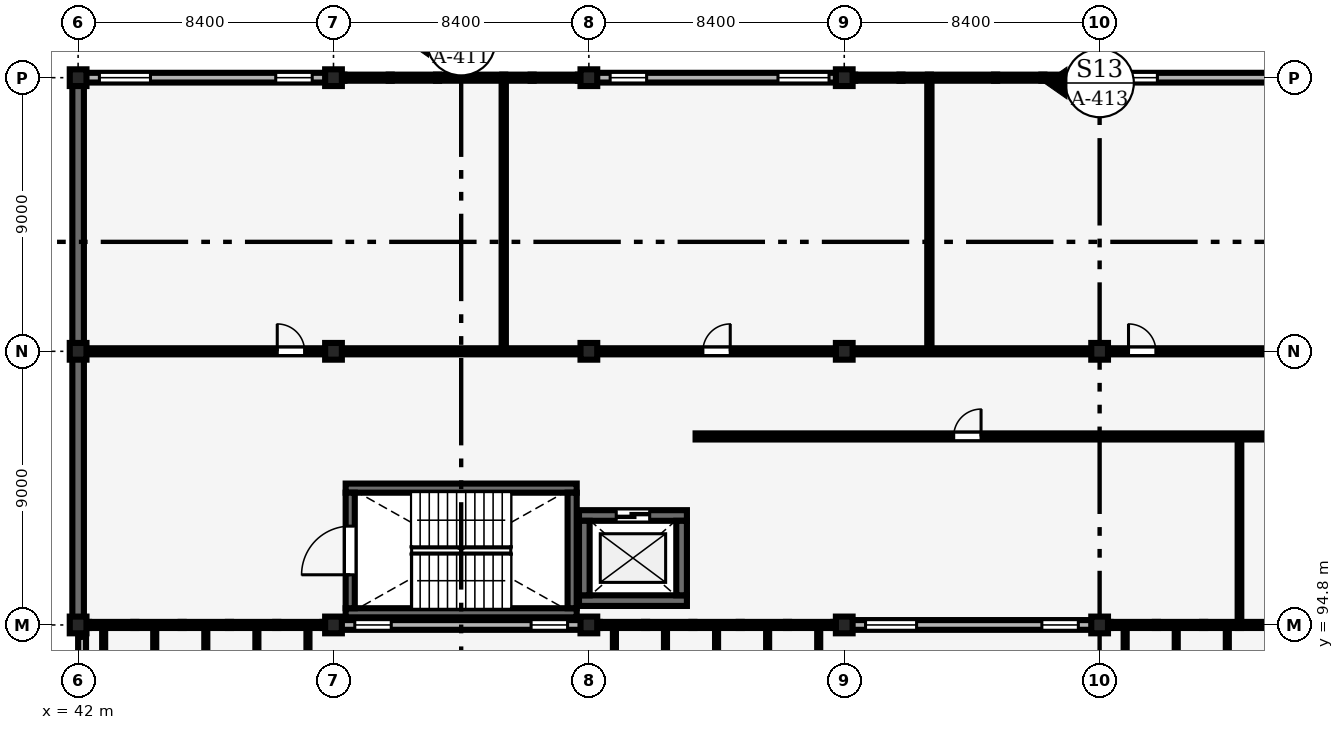
"""IFC4 building model, lengths in metres.
Left out: names, types, materials, properties, quantities, classifications, styles, units other than length and angle.
Written with IfcOpenShell. Run it as: python <this file> out.ifc"""

import sys

from ifc_helpers import new_model, si_unit, direction, frame, frame_2d, origin, origin_2d, place, context, subcontext, project, spatial, rectangle, extrude, element, fill, save


model = new_model("IFC4")
c1 = context("Model", 3, precision=1e-05, world=origin(), true_north=direction((0.0, 1.0)))
c2 = subcontext(c1, "Body", "Model", "MODEL_VIEW")
j1 = project(units=[si_unit("LENGTHUNIT", "METRE"), si_unit("PLANEANGLEUNIT", "RADIAN")], contexts=[c1])
p1 = place(None, origin())
s1 = spatial("IfcSite", under=j1, at=p1, CompositionType="ELEMENT")
p2 = place(p1, origin())
s2 = spatial("IfcBuilding", under=s1, at=p2, CompositionType="ELEMENT")
p3 = place(p2, frame((0.0, 0.0, 9.0)))
s3 = spatial("IfcBuildingStorey", under=s2, at=p3, CompositionType="ELEMENT", Elevation=9.0)
for number, where, z_axis, x_axis in (
    (1, (42.0, 94.8, 0.0), (0.0, 0.0, 1.0), (1.0, 0.0, 0.0)),
    (2, (42.0, 103.8, 0.0), (0.0, 0.0, 1.0), (1.0, 0.0, 0.0)),
    (3, (42.0, 112.8, 0.0), (0.0, 0.0, 1.0), (1.0, 0.0, 0.0)),
    (4, (50.4, 94.8, 0.0), (0.0, 0.0, 1.0), (1.0, 0.0, 0.0)),
    (5, (50.4, 103.8, 0.0), (0.0, 0.0, 1.0), (1.0, 0.0, 0.0)),
    (6, (50.4, 112.8, 0.0), (0.0, 0.0, 1.0), (1.0, 0.0, 0.0)),
    (7, (58.8, 94.8, 0.0), (0.0, 0.0, 1.0), (1.0, 0.0, 0.0)),
    (8, (58.8, 103.8, 0.0), (0.0, 0.0, 1.0), (1.0, 0.0, 0.0)),
    (9, (58.8, 112.8, 0.0), (0.0, 0.0, 1.0), (1.0, 0.0, 0.0)),
    (10, (67.2, 94.8, 0.0), (0.0, 0.0, 1.0), (1.0, 0.0, 0.0)),
    (11, (67.2, 103.8, 0.0), (0.0, 0.0, 1.0), (1.0, 0.0, 0.0)),
    (12, (67.2, 112.8, 0.0), (0.0, 0.0, 1.0), (1.0, 0.0, 0.0)),
    (13, (75.6, 94.8, 0.0), (0.0, 0.0, 1.0), (1.0, 0.0, 0.0)),
    (14, (75.6, 103.8, 0.0), (0.0, 0.0, 1.0), (1.0, 0.0, 0.0)),
    (15, (75.6, 112.8, 0.0), (0.0, 0.0, 1.0), (1.0, 0.0, 0.0)),
):
    element("IfcColumn", number, at=place(p3, frame(where, z_axis=z_axis, x_axis=x_axis)), inside=s3, PredefinedType="COLUMN", context=c2, shape_type="SweptSolid", body=[
        extrude(rectangle(XDim=0.55, YDim=0.55, at=origin_2d()), origin(), (0.0, 0.0, 1.0), 4.2),
    ])
p4 = place(p3, frame((42.25, 112.8, 0.0), z_axis=(0.0, 0.0, 1.0), x_axis=(1.0, 0.0, 0.0)))
e16 = element("IfcWall", 16, at=p4, inside=s3, PredefinedType="SOLIDWALL", context=c2, shape_type="SweptSolid", body=[
    extrude(rectangle(XDim=7.9, YDim=0.32, at=frame_2d((3.95, 0.0))), origin(), (0.0, 0.0, 1.0), 2.81),
])
p5 = place(p4, frame((0.45, 0.0, 0.9)))
e17 = element("IfcOpeningElement", 17, at=p5, cuts=e16, PredefinedType="OPENING", context=c2, shape_type="SweptSolid", body=[
    extrude(rectangle(XDim=1.68, YDim=1.76, at=frame_2d((0.84, 0.88))), frame((0.0, 0.17, 0.0), z_axis=(0.0, -1.0, 0.0), x_axis=(1.0, 0.0, 0.0)), (0.0, 0.0, 1.0), 0.34),
])
p6 = place(p4, frame((6.25, 0.0, 0.9)))
e18 = element("IfcOpeningElement", 18, at=p6, cuts=e16, PredefinedType="OPENING", context=c2, shape_type="SweptSolid", body=[
    extrude(rectangle(XDim=1.2, YDim=1.5, at=frame_2d((0.6, 0.75))), frame((0.0, 0.17, 0.0), z_axis=(0.0, -1.0, 0.0), x_axis=(1.0, 0.0, 0.0)), (0.0, 0.0, 1.0), 0.34),
])
p7 = place(p3, frame((59.05, 112.8, 0.0), z_axis=(0.0, 0.0, 1.0), x_axis=(1.0, 0.0, 0.0)))
e19 = element("IfcWall", 19, at=p7, inside=s3, PredefinedType="SOLIDWALL", context=c2, shape_type="SweptSolid", body=[
    extrude(rectangle(XDim=7.9, YDim=0.32, at=frame_2d((3.95, 0.0))), origin(), (0.0, 0.0, 1.0), 3.36),
])
p8 = place(p7, frame((0.45, 0.0, 0.9)))
e20 = element("IfcOpeningElement", 20, at=p8, cuts=e19, PredefinedType="OPENING", context=c2, shape_type="SweptSolid", body=[
    extrude(rectangle(XDim=1.2, YDim=1.8, at=frame_2d((0.6, 0.9))), frame((0.0, 0.17, 0.0), z_axis=(0.0, -1.0, 0.0), x_axis=(1.0, 0.0, 0.0)), (0.0, 0.0, 1.0), 0.34),
])
p9 = place(p7, frame((5.97, 0.0, 0.9)))
e21 = element("IfcOpeningElement", 21, at=p9, cuts=e19, PredefinedType="OPENING", context=c2, shape_type="SweptSolid", body=[
    extrude(rectangle(XDim=1.68, YDim=2.31, at=frame_2d((0.84, 1.155))), frame((0.0, 0.17, 0.0), z_axis=(0.0, -1.0, 0.0), x_axis=(1.0, 0.0, 0.0)), (0.0, 0.0, 1.0), 0.34),
])
p10 = place(p3, frame((75.85, 112.8, 0.0), z_axis=(0.0, 0.0, 1.0), x_axis=(1.0, 0.0, 0.0)))
e22 = element("IfcWall", 22, at=p10, inside=s3, PredefinedType="SOLIDWALL", context=c2, shape_type="SweptSolid", body=[
    extrude(rectangle(XDim=7.9, YDim=0.32, at=frame_2d((3.95, 0.0))), origin(), (0.0, 0.0, 1.0), 3.26),
])
p11 = place(p10, frame((0.45, 0.0, 0.9)))
e23 = element("IfcOpeningElement", 23, at=p11, cuts=e22, PredefinedType="OPENING", context=c2, shape_type="SweptSolid", body=[
    extrude(rectangle(XDim=1.2, YDim=1.5, at=frame_2d((0.6, 0.75))), frame((0.0, 0.17, 0.0), z_axis=(0.0, -1.0, 0.0), x_axis=(1.0, 0.0, 0.0)), (0.0, 0.0, 1.0), 0.34),
])
p12 = place(p10, frame((6.25, 0.0, 0.9)))
e24 = element("IfcOpeningElement", 24, at=p12, cuts=e22, PredefinedType="OPENING", context=c2, shape_type="SweptSolid", body=[
    extrude(rectangle(XDim=1.2, YDim=1.8, at=frame_2d((0.6, 0.9))), frame((0.0, 0.17, 0.0), z_axis=(0.0, -1.0, 0.0), x_axis=(1.0, 0.0, 0.0)), (0.0, 0.0, 1.0), 0.34),
])
p13 = place(p3, frame((42.0, 95.05, 0.0), z_axis=(0.0, 0.0, 1.0), x_axis=(0.0, 1.0, 0.0)))
e25 = element("IfcWall", 25, at=p13, inside=s3, PredefinedType="SHEAR", context=c2, shape_type="SweptSolid", body=[
    extrude(rectangle(XDim=8.5, YDim=0.38, at=frame_2d((4.25, 0.0))), origin(), (0.0, 0.0, 1.0), 3.36),
])
p14 = place(p3, frame((42.0, 104.05, 0.0), z_axis=(0.0, 0.0, 1.0), x_axis=(0.0, 1.0, 0.0)))
e26 = element("IfcWall", 26, at=p14, inside=s3, PredefinedType="SHEAR", context=c2, shape_type="SweptSolid", body=[
    extrude(rectangle(XDim=8.5, YDim=0.38, at=frame_2d((4.25, 0.0))), origin(), (0.0, 0.0, 1.0), 3.31),
])
p15 = place(p3, frame((50.65, 94.8, 0.0), z_axis=(0.0, 0.0, 1.0), x_axis=(1.0, 0.0, 0.0)))
e27 = element("IfcWall", 27, at=p15, inside=s3, PredefinedType="SOLIDWALL", context=c2, shape_type="SweptSolid", body=[
    extrude(rectangle(XDim=7.9, YDim=0.32, at=frame_2d((3.95, 0.0))), origin(), (0.0, 0.0, 1.0), 3.36),
])
p16 = place(p15, frame((0.45, 0.0, 0.9)))
e28 = element("IfcOpeningElement", 28, at=p16, cuts=e27, PredefinedType="OPENING", context=c2, shape_type="SweptSolid", body=[
    extrude(rectangle(XDim=1.2, YDim=1.5, at=frame_2d((0.6, 0.75))), frame((0.0, 0.17, 0.0), z_axis=(0.0, -1.0, 0.0), x_axis=(1.0, 0.0, 0.0)), (0.0, 0.0, 1.0), 0.34),
])
p17 = place(p15, frame((6.25, 0.0, 0.9)))
e29 = element("IfcOpeningElement", 29, at=p17, cuts=e27, PredefinedType="OPENING", context=c2, shape_type="SweptSolid", body=[
    extrude(rectangle(XDim=1.2, YDim=1.8, at=frame_2d((0.6, 0.9))), frame((0.0, 0.17, 0.0), z_axis=(0.0, -1.0, 0.0), x_axis=(1.0, 0.0, 0.0)), (0.0, 0.0, 1.0), 0.34),
])
p18 = place(p3, frame((67.45, 94.8, 0.0), z_axis=(0.0, 0.0, 1.0), x_axis=(1.0, 0.0, 0.0)))
e30 = element("IfcWall", 30, at=p18, inside=s3, PredefinedType="SOLIDWALL", context=c2, shape_type="SweptSolid", body=[
    extrude(rectangle(XDim=7.9, YDim=0.32, at=frame_2d((3.95, 0.0))), origin(), (0.0, 0.0, 1.0), 3.31),
])
p19 = place(p18, frame((0.45, 0.0, 0.9)))
e31 = element("IfcOpeningElement", 31, at=p19, cuts=e30, PredefinedType="OPENING", context=c2, shape_type="SweptSolid", body=[
    extrude(rectangle(XDim=1.68, YDim=2.26, at=frame_2d((0.84, 1.13))), frame((0.0, 0.17, 0.0), z_axis=(0.0, -1.0, 0.0), x_axis=(1.0, 0.0, 0.0)), (0.0, 0.0, 1.0), 0.34),
])
p20 = place(p18, frame((6.25, 0.0, 0.9)))
e32 = element("IfcOpeningElement", 32, at=p20, cuts=e30, PredefinedType="OPENING", context=c2, shape_type="SweptSolid", body=[
    extrude(rectangle(XDim=1.2, YDim=1.5, at=frame_2d((0.6, 0.75))), frame((0.0, 0.17, 0.0), z_axis=(0.0, -1.0, 0.0), x_axis=(1.0, 0.0, 0.0)), (0.0, 0.0, 1.0), 0.34),
])
p21 = place(p3, frame((42.13, 86.19, 0.0), z_axis=(0.0, 0.0, 1.0), x_axis=(0.0, 1.0, 0.0)))
e33 = element("IfcWall", 33, at=p21, inside=s3, PredefinedType="PARAPET", context=c2, shape_type="SweptSolid", body=[
    extrude(rectangle(XDim=8.22, YDim=0.26, at=frame_2d((4.11, 0.0))), origin(), (0.0, 0.0, 1.0), 0.85),
])
for number, where, z_axis, x_axis in (
    (34, (50.8, 95.2, 0.0), (0.0, 0.0, 1.0), (1.0, 0.0, 0.0)),
    (35, (50.8, 99.3, 0.0), (0.0, 0.0, 1.0), (1.0, 0.0, 0.0)),
):
    element("IfcWall", number, at=place(p3, frame(where, z_axis=z_axis, x_axis=x_axis)), inside=s3, PredefinedType="SHEAR", context=c2, shape_type="SweptSolid", body=[
        extrude(rectangle(XDim=7.6, YDim=0.3, at=frame_2d((3.8, 0.0))), origin(), (0.0, 0.0, 1.0), 4.025),
    ])
p22 = place(p3, frame((50.95, 95.35, 0.0), z_axis=(0.0, 0.0, 1.0), x_axis=(0.0, 1.0, 0.0)))
e36 = element("IfcWall", 36, at=p22, inside=s3, PredefinedType="SHEAR", context=c2, shape_type="SweptSolid", body=[
    extrude(rectangle(XDim=3.8, YDim=0.3, at=frame_2d((1.9, 0.0))), origin(), (0.0, 0.0, 1.0), 4.025),
])
p23 = place(p22, frame((1.1, 0.0, 0.0)))
e37 = element("IfcOpeningElement", 37, at=p23, cuts=e36, PredefinedType="OPENING", context=c2, shape_type="SweptSolid", body=[
    extrude(rectangle(XDim=1.6, YDim=2.2, at=frame_2d((0.8, 1.1))), frame((0.0, 0.16, 0.0), z_axis=(0.0, -1.0, 0.0), x_axis=(1.0, 0.0, 0.0)), (0.0, 0.0, 1.0), 0.32),
])
p24 = place(p3, frame((58.25, 95.35, 0.0), z_axis=(0.0, 0.0, 1.0), x_axis=(0.0, 1.0, 0.0)))
e38 = element("IfcWall", 38, at=p24, inside=s3, PredefinedType="SHEAR", context=c2, shape_type="SweptSolid", body=[
    extrude(rectangle(XDim=3.8, YDim=0.3, at=frame_2d((1.9, 0.0))), origin(), (0.0, 0.0, 1.0), 4.025),
])
p25 = place(p3, frame((58.475, 95.6, 0.0), z_axis=(0.0, 0.0, 1.0), x_axis=(1.0, 0.0, 0.0)))
e39 = element("IfcWall", 39, at=p25, inside=s3, PredefinedType="SHEAR", context=c2, shape_type="SweptSolid", body=[
    extrude(rectangle(XDim=3.55, YDim=0.35, at=frame_2d((1.775, 0.0))), origin(), (0.0, 0.0, 1.0), 3.92),
])
p26 = place(p3, frame((58.475, 98.4, 0.0), z_axis=(0.0, 0.0, 1.0), x_axis=(1.0, 0.0, 0.0)))
e40 = element("IfcWall", 40, at=p26, inside=s3, PredefinedType="SHEAR", context=c2, shape_type="SweptSolid", body=[
    extrude(rectangle(XDim=3.55, YDim=0.35, at=frame_2d((1.775, 0.0))), origin(), (0.0, 0.0, 1.0), 3.92),
])
p27 = place(p26, frame((1.225, 0.0, 0.0)))
e41 = element("IfcOpeningElement", 41, at=p27, cuts=e40, PredefinedType="OPENING", context=c2, shape_type="SweptSolid", body=[
    extrude(rectangle(XDim=1.1, YDim=2.2, at=frame_2d((0.55, 1.1))), frame((0.0, 0.185, 0.0), z_axis=(0.0, -1.0, 0.0), x_axis=(1.0, 0.0, 0.0)), (0.0, 0.0, 1.0), 0.37),
])
for number, where, z_axis, x_axis in (
    (42, (58.65, 95.775, 0.0), (0.0, 0.0, 1.0), (0.0, 1.0, 0.0)),
    (43, (61.85, 95.775, 0.0), (0.0, 0.0, 1.0), (0.0, 1.0, 0.0)),
):
    element("IfcWall", number, at=place(p3, frame(where, z_axis=z_axis, x_axis=x_axis)), inside=s3, PredefinedType="SHEAR", context=c2, shape_type="SweptSolid", body=[
        extrude(rectangle(XDim=2.45, YDim=0.35, at=frame_2d((1.225, 0.0))), origin(), (0.0, 0.0, 1.0), 3.92),
    ])
for number, where, z_axis, x_axis in (
    (44, (56.0, 103.905, 0.0), (0.0, 0.0, 1.0), (0.0, 1.0, 0.0)),
    (45, (70.0, 103.905, 0.0), (0.0, 0.0, 1.0), (0.0, 1.0, 0.0)),
):
    element("IfcWall", number, at=place(p3, frame(where, z_axis=z_axis, x_axis=x_axis)), inside=s3, PredefinedType="PARTITIONING", context=c2, shape_type="SweptSolid", body=[
        extrude(rectangle(XDim=8.79, YDim=0.14, at=frame_2d((4.395, 0.0))), origin(), (0.0, 0.0, 1.0), 3.9),
    ])
p28 = place(p3, frame((42.195, 103.8, 0.0), z_axis=(0.0, 0.0, 1.0), x_axis=(1.0, 0.0, 0.0)))
e46 = element("IfcWall", 46, at=p28, inside=s3, PredefinedType="PARTITIONING", context=c2, shape_type="SweptSolid", body=[
    extrude(rectangle(XDim=7.92, YDim=0.2, at=frame_2d((3.96, 0.0))), origin(), (0.0, 0.0, 1.0), 3.21),
])
p29 = place(p28, frame((6.355, 0.0, 0.0)))
e47 = element("IfcOpeningElement", 47, at=p29, cuts=e46, PredefinedType="OPENING", context=c2, shape_type="SweptSolid", body=[
    extrude(rectangle(XDim=0.9, YDim=2.1, at=frame_2d((0.45, 1.05))), frame((0.0, 0.11, 0.0), z_axis=(0.0, -1.0, 0.0), x_axis=(1.0, 0.0, 0.0)), (0.0, 0.0, 1.0), 0.22),
])
p30 = place(p3, frame((50.685, 103.8, 0.0), z_axis=(0.0, 0.0, 1.0), x_axis=(1.0, 0.0, 0.0)))
e48 = element("IfcWall", 48, at=p30, inside=s3, PredefinedType="PARTITIONING", context=c2, shape_type="SweptSolid", body=[
    extrude(rectangle(XDim=7.83, YDim=0.2, at=frame_2d((3.915, 0.0))), origin(), (0.0, 0.0, 1.0), 3.16),
])
p31 = place(p3, frame((59.085, 103.8, 0.0), z_axis=(0.0, 0.0, 1.0), x_axis=(1.0, 0.0, 0.0)))
e49 = element("IfcWall", 49, at=p31, inside=s3, PredefinedType="PARTITIONING", context=c2, shape_type="SweptSolid", body=[
    extrude(rectangle(XDim=7.83, YDim=0.2, at=frame_2d((3.915, 0.0))), origin(), (0.0, 0.0, 1.0), 3.11),
])
p32 = place(p31, frame((3.465, 0.0, 0.0)))
e50 = element("IfcOpeningElement", 50, at=p32, cuts=e49, PredefinedType="OPENING", context=c2, shape_type="SweptSolid", body=[
    extrude(rectangle(XDim=0.9, YDim=2.1, at=frame_2d((0.45, 1.05))), frame((0.0, 0.11, 0.0), z_axis=(0.0, -1.0, 0.0), x_axis=(1.0, 0.0, 0.0)), (0.0, 0.0, 1.0), 0.22),
])
p33 = place(p3, frame((67.485, 103.8, 0.0), z_axis=(0.0, 0.0, 1.0), x_axis=(1.0, 0.0, 0.0)))
e51 = element("IfcWall", 51, at=p33, inside=s3, PredefinedType="PARTITIONING", context=c2, shape_type="SweptSolid", body=[
    extrude(rectangle(XDim=7.83, YDim=0.2, at=frame_2d((3.915, 0.0))), origin(), (0.0, 0.0, 1.0), 3.11),
])
p34 = place(p3, frame((75.885, 103.8, 0.0), z_axis=(0.0, 0.0, 1.0), x_axis=(1.0, 0.0, 0.0)))
e52 = element("IfcWall", 52, at=p34, inside=s3, PredefinedType="PARTITIONING", context=c2, shape_type="SweptSolid", body=[
    extrude(rectangle(XDim=7.83, YDim=0.2, at=frame_2d((3.915, 0.0))), origin(), (0.0, 0.0, 1.0), 3.06),
])
p35 = place(p34, frame((0.665, 0.0, 0.0)))
e53 = element("IfcOpeningElement", 53, at=p35, cuts=e52, PredefinedType="OPENING", context=c2, shape_type="SweptSolid", body=[
    extrude(rectangle(XDim=0.9, YDim=2.1, at=frame_2d((0.45, 1.05))), frame((0.0, 0.11, 0.0), z_axis=(0.0, -1.0, 0.0), x_axis=(1.0, 0.0, 0.0)), (0.0, 0.0, 1.0), 0.22),
])
p36 = place(p3, frame((80.2, 94.905, 0.0), z_axis=(0.0, 0.0, 1.0), x_axis=(0.0, 1.0, 0.0)))
e54 = element("IfcWall", 54, at=p36, inside=s3, PredefinedType="PARTITIONING", context=c2, shape_type="SweptSolid", body=[
    extrude(rectangle(XDim=5.99, YDim=0.12, at=frame_2d((2.995, 0.0))), origin(), (0.0, 0.0, 1.0), 3.9),
])
p37 = place(p3, frame((62.31, 101.0, 0.0), z_axis=(0.0, 0.0, 1.0), x_axis=(1.0, 0.0, 0.0)))
e55 = element("IfcWall", 55, at=p37, inside=s3, PredefinedType="PARTITIONING", context=c2, shape_type="SweptSolid", body=[
    extrude(rectangle(XDim=35.88, YDim=0.2, at=frame_2d((17.94, 0.0))), origin(), (0.0, 0.0, 1.0), 3.48),
])
p38 = place(p37, frame((8.49, 0.0, 0.0)))
e56 = element("IfcOpeningElement", 56, at=p38, cuts=e55, PredefinedType="OPENING", context=c2, shape_type="SweptSolid", body=[
    extrude(rectangle(XDim=0.9, YDim=2.1, at=frame_2d((0.45, 1.05))), frame((0.0, 0.11, 0.0), z_axis=(0.0, -1.0, 0.0), x_axis=(1.0, 0.0, 0.0)), (0.0, 0.0, 1.0), 0.22),
])
p39 = place(p37, frame((26.44, 0.0, 0.0)))
e57 = element("IfcOpeningElement", 57, at=p39, cuts=e55, PredefinedType="OPENING", context=c2, shape_type="SweptSolid", body=[
    extrude(rectangle(XDim=0.9, YDim=2.1, at=frame_2d((0.45, 1.05))), frame((0.0, 0.11, 0.0), z_axis=(0.0, -1.0, 0.0), x_axis=(1.0, 0.0, 0.0)), (0.0, 0.0, 1.0), 0.22),
])
p40 = place(p5, origin())
e58 = element("IfcWindow", 58, at=p40, inside=s3, PartitioningType="SINGLE_PANEL", PredefinedType="WINDOW", context=c2, shape_type="SweptSolid", body=[
    extrude(rectangle(XDim=1.68, YDim=1.76, at=frame_2d((0.84, 0.88))), frame((0.0, 0.03, 0.0), z_axis=(0.0, -1.0, 0.0), x_axis=(1.0, 0.0, 0.0)), (0.0, 0.0, 1.0), 0.06),
])
fill(e17, e58)
p41 = place(p6, origin())
e59 = element("IfcWindow", 59, at=p41, inside=s3, PartitioningType="SINGLE_PANEL", PredefinedType="WINDOW", context=c2, shape_type="SweptSolid", body=[
    extrude(rectangle(XDim=1.2, YDim=1.5, at=frame_2d((0.6, 0.75))), frame((0.0, 0.03, 0.0), z_axis=(0.0, -1.0, 0.0), x_axis=(1.0, 0.0, 0.0)), (0.0, 0.0, 1.0), 0.06),
])
fill(e18, e59)
p42 = place(p8, origin())
e60 = element("IfcWindow", 60, at=p42, inside=s3, PartitioningType="SINGLE_PANEL", PredefinedType="WINDOW", context=c2, shape_type="SweptSolid", body=[
    extrude(rectangle(XDim=1.2, YDim=1.8, at=frame_2d((0.6, 0.9))), frame((0.0, 0.03, 0.0), z_axis=(0.0, -1.0, 0.0), x_axis=(1.0, 0.0, 0.0)), (0.0, 0.0, 1.0), 0.06),
])
fill(e20, e60)
p43 = place(p9, origin())
e61 = element("IfcWindow", 61, at=p43, inside=s3, PartitioningType="SINGLE_PANEL", PredefinedType="WINDOW", context=c2, shape_type="SweptSolid", body=[
    extrude(rectangle(XDim=1.68, YDim=2.31, at=frame_2d((0.84, 1.155))), frame((0.0, 0.03, 0.0), z_axis=(0.0, -1.0, 0.0), x_axis=(1.0, 0.0, 0.0)), (0.0, 0.0, 1.0), 0.06),
])
fill(e21, e61)
p44 = place(p11, origin())
e62 = element("IfcWindow", 62, at=p44, inside=s3, PartitioningType="SINGLE_PANEL", PredefinedType="WINDOW", context=c2, shape_type="SweptSolid", body=[
    extrude(rectangle(XDim=1.2, YDim=1.5, at=frame_2d((0.6, 0.75))), frame((0.0, 0.03, 0.0), z_axis=(0.0, -1.0, 0.0), x_axis=(1.0, 0.0, 0.0)), (0.0, 0.0, 1.0), 0.06),
])
fill(e23, e62)
p45 = place(p16, origin())
e63 = element("IfcWindow", 63, at=p45, inside=s3, PartitioningType="SINGLE_PANEL", PredefinedType="WINDOW", context=c2, shape_type="SweptSolid", body=[
    extrude(rectangle(XDim=1.2, YDim=1.5, at=frame_2d((0.6, 0.75))), frame((0.0, 0.03, 0.0), z_axis=(0.0, -1.0, 0.0), x_axis=(1.0, 0.0, 0.0)), (0.0, 0.0, 1.0), 0.06),
])
fill(e28, e63)
p46 = place(p17, origin())
e64 = element("IfcWindow", 64, at=p46, inside=s3, PartitioningType="SINGLE_PANEL", PredefinedType="WINDOW", context=c2, shape_type="SweptSolid", body=[
    extrude(rectangle(XDim=1.2, YDim=1.8, at=frame_2d((0.6, 0.9))), frame((0.0, 0.03, 0.0), z_axis=(0.0, -1.0, 0.0), x_axis=(1.0, 0.0, 0.0)), (0.0, 0.0, 1.0), 0.06),
])
fill(e29, e64)
p47 = place(p19, origin())
e65 = element("IfcWindow", 65, at=p47, inside=s3, PartitioningType="SINGLE_PANEL", PredefinedType="WINDOW", context=c2, shape_type="SweptSolid", body=[
    extrude(rectangle(XDim=1.68, YDim=2.26, at=frame_2d((0.84, 1.13))), frame((0.0, 0.03, 0.0), z_axis=(0.0, -1.0, 0.0), x_axis=(1.0, 0.0, 0.0)), (0.0, 0.0, 1.0), 0.06),
])
fill(e31, e65)
p48 = place(p20, origin())
e66 = element("IfcWindow", 66, at=p48, inside=s3, PartitioningType="SINGLE_PANEL", PredefinedType="WINDOW", context=c2, shape_type="SweptSolid", body=[
    extrude(rectangle(XDim=1.2, YDim=1.5, at=frame_2d((0.6, 0.75))), frame((0.0, 0.03, 0.0), z_axis=(0.0, -1.0, 0.0), x_axis=(1.0, 0.0, 0.0)), (0.0, 0.0, 1.0), 0.06),
])
fill(e32, e66)
p49 = place(p23, origin())
e67 = element("IfcDoor", 67, at=p49, inside=s3, OperationType="DOUBLE_DOOR_SINGLE_SWING", PredefinedType="DOOR", context=c2, shape_type="SweptSolid", body=[
    extrude(rectangle(XDim=1.6, YDim=2.2, at=frame_2d((0.8, 1.1))), frame((0.0, 0.025, 0.0), z_axis=(0.0, -1.0, 0.0), x_axis=(1.0, 0.0, 0.0)), (0.0, 0.0, 1.0), 0.05),
])
fill(e37, e67)
p50 = place(p27, origin())
e68 = element("IfcDoor", 68, at=p50, inside=s3, OperationType="DOUBLE_DOOR_SLIDING", PredefinedType="DOOR", context=c2, shape_type="SweptSolid", body=[
    extrude(rectangle(XDim=1.1, YDim=2.2, at=frame_2d((0.55, 1.1))), frame((0.0, 0.025, 0.0), z_axis=(0.0, -1.0, 0.0), x_axis=(1.0, 0.0, 0.0)), (0.0, 0.0, 1.0), 0.05),
])
fill(e41, e68)
p51 = place(p29, origin())
e69 = element("IfcDoor", 69, at=p51, inside=s3, OperationType="SINGLE_SWING_LEFT", PredefinedType="DOOR", context=c2, shape_type="SweptSolid", body=[
    extrude(rectangle(XDim=0.9, YDim=2.1, at=frame_2d((0.45, 1.05))), frame((0.0, 0.025, 0.0), z_axis=(0.0, -1.0, 0.0), x_axis=(1.0, 0.0, 0.0)), (0.0, 0.0, 1.0), 0.05),
])
fill(e47, e69)
p52 = place(p32, origin())
e70 = element("IfcDoor", 70, at=p52, inside=s3, OperationType="SINGLE_SWING_RIGHT", PredefinedType="DOOR", context=c2, shape_type="SweptSolid", body=[
    extrude(rectangle(XDim=0.9, YDim=2.1, at=frame_2d((0.45, 1.05))), frame((0.0, 0.025, 0.0), z_axis=(0.0, -1.0, 0.0), x_axis=(1.0, 0.0, 0.0)), (0.0, 0.0, 1.0), 0.05),
])
fill(e50, e70)
p53 = place(p35, origin())
e71 = element("IfcDoor", 71, at=p53, inside=s3, OperationType="SINGLE_SWING_LEFT", PredefinedType="DOOR", context=c2, shape_type="SweptSolid", body=[
    extrude(rectangle(XDim=0.9, YDim=2.1, at=frame_2d((0.45, 1.05))), frame((0.0, 0.025, 0.0), z_axis=(0.0, -1.0, 0.0), x_axis=(1.0, 0.0, 0.0)), (0.0, 0.0, 1.0), 0.05),
])
fill(e53, e71)
p54 = place(p38, origin())
e72 = element("IfcDoor", 72, at=p54, inside=s3, OperationType="SINGLE_SWING_RIGHT", PredefinedType="DOOR", context=c2, shape_type="SweptSolid", body=[
    extrude(rectangle(XDim=0.9, YDim=2.1, at=frame_2d((0.45, 1.05))), frame((0.0, 0.025, 0.0), z_axis=(0.0, -1.0, 0.0), x_axis=(1.0, 0.0, 0.0)), (0.0, 0.0, 1.0), 0.05),
])
fill(e56, e72)
save(model, sys.argv[1])
